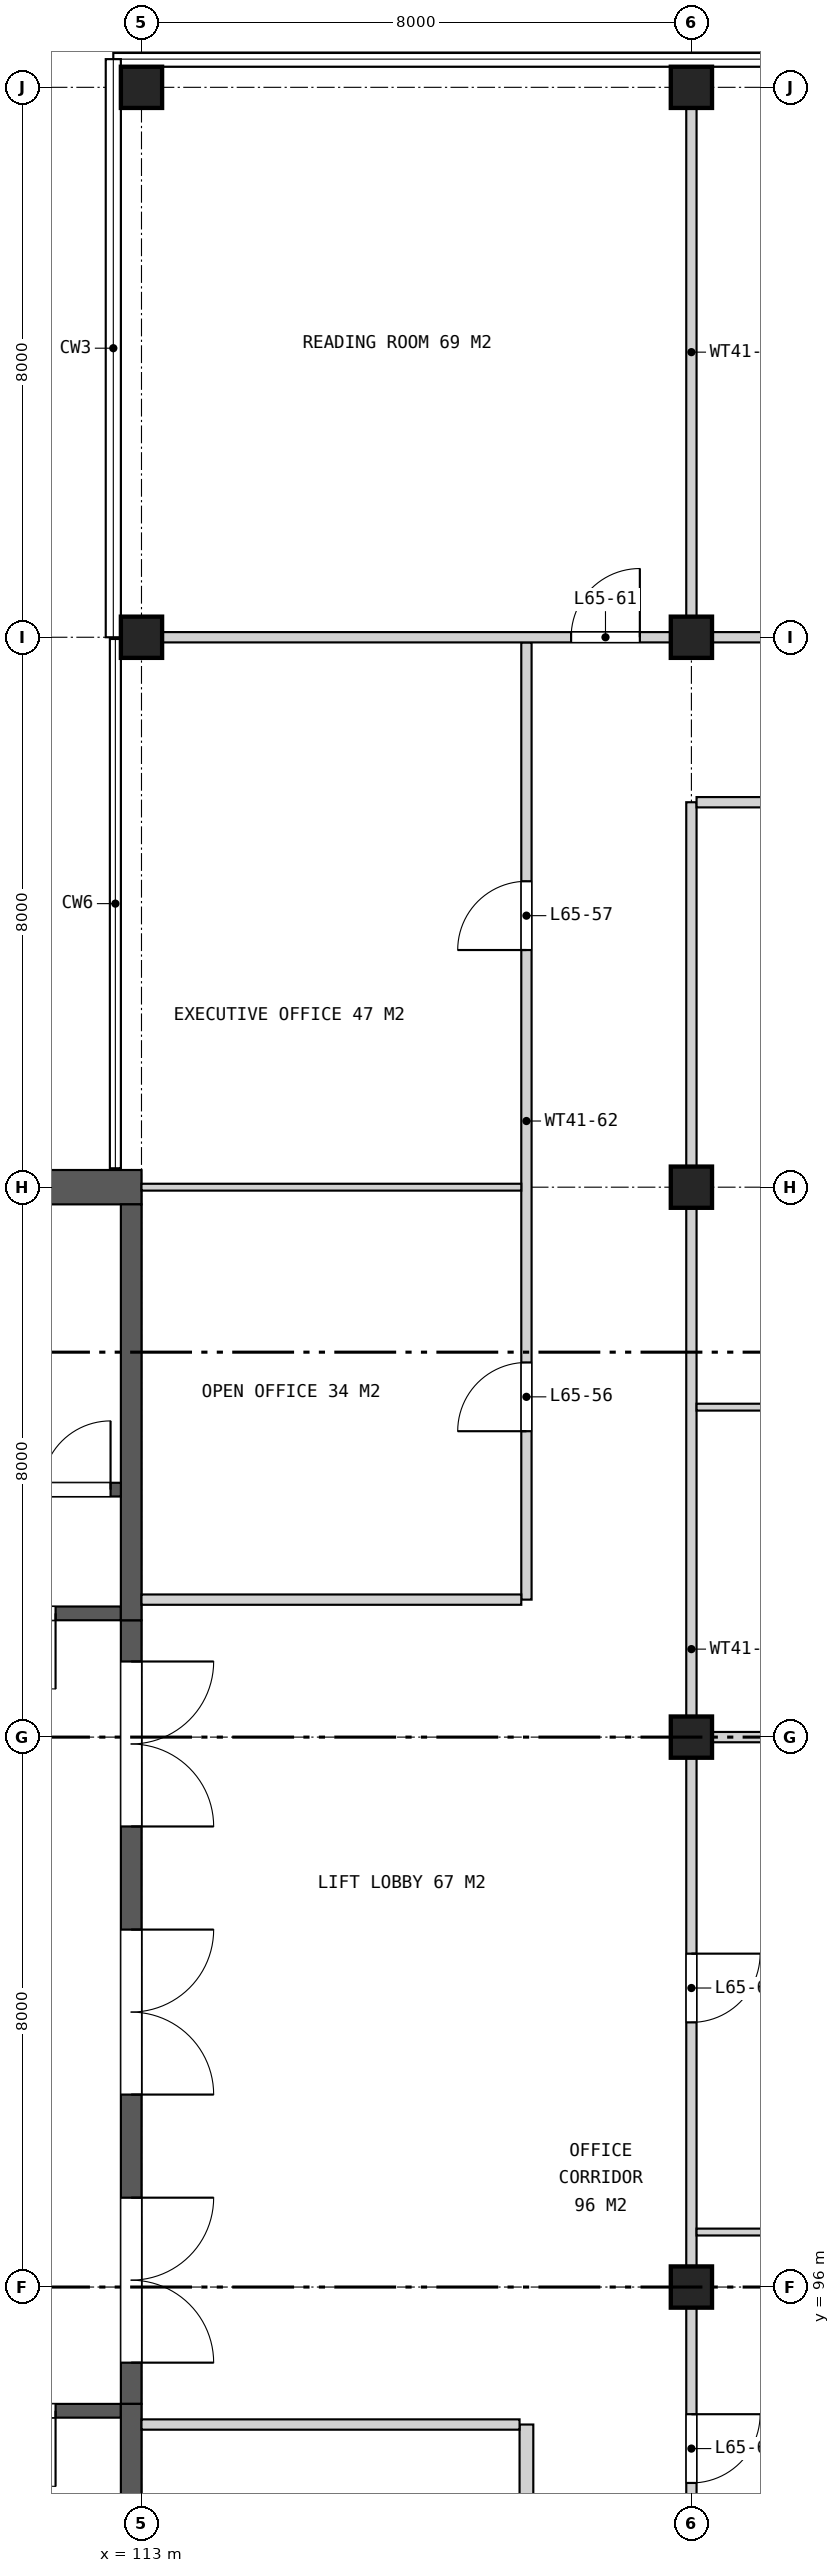
"""IFC4 building model, lengths in metres.
Left out: names, types, materials, properties, quantities, classifications, styles, units other than length and angle.
Written with IfcOpenShell. Run it as: python <this file> out.ifc"""

import sys

from ifc_helpers import new_model, si_unit, direction, frame, frame_2d, origin, origin_2d, place, context, subcontext, project, spatial, rectangle, extrude, element, fill, save


model = new_model("IFC4")
c1 = context("Model", 3, precision=1e-05, world=origin(), true_north=direction((0.0, 1.0)))
c2 = subcontext(c1, "Body", "Model", "MODEL_VIEW")
j1 = project(units=[si_unit("LENGTHUNIT", "METRE"), si_unit("PLANEANGLEUNIT", "RADIAN")], contexts=[c1])
p1 = place(None, origin())
s1 = spatial("IfcSite", under=j1, at=p1, CompositionType="ELEMENT")
p2 = place(p1, origin())
s2 = spatial("IfcBuilding", under=s1, at=p2, CompositionType="ELEMENT")
p3 = place(p2, frame((0.0, 0.0, 299.7)))
s3 = spatial("IfcBuildingStorey", under=s2, at=p3, CompositionType="ELEMENT", Elevation=299.7)
for number, where, z_axis, x_axis in (
    (1, (113.0, 120.0, 0.0), (0.0, 0.0, 1.0), (1.0, 0.0, 0.0)),
    (2, (113.0, 128.0, 0.0), (0.0, 0.0, 1.0), (1.0, 0.0, 0.0)),
    (3, (121.0, 96.0, 0.0), (0.0, 0.0, 1.0), (1.0, 0.0, 0.0)),
    (4, (121.0, 104.0, 0.0), (0.0, 0.0, 1.0), (1.0, 0.0, 0.0)),
    (5, (121.0, 112.0, 0.0), (0.0, 0.0, 1.0), (1.0, 0.0, 0.0)),
    (6, (121.0, 120.0, 0.0), (0.0, 0.0, 1.0), (1.0, 0.0, 0.0)),
    (7, (121.0, 128.0, 0.0), (0.0, 0.0, 1.0), (1.0, 0.0, 0.0)),
):
    element("IfcColumn", number, at=place(p3, frame(where, z_axis=z_axis, x_axis=x_axis)), inside=s3, PredefinedType="COLUMN", context=c2, shape_type="SweptSolid", body=[
        extrude(rectangle(XDim=0.6, YDim=0.6, at=origin_2d()), origin(), (0.0, 0.0, 1.0), 4.2),
    ])
p4 = place(p3, frame((113.0, 112.0, 0.0), z_axis=(0.0, 0.0, 1.0), x_axis=(-1.0, 0.0, 0.0)))
e8 = element("IfcWall", 8, at=p4, inside=s3, PredefinedType="SHEAR", context=c2, shape_type="SweptSolid", body=[
    extrude(rectangle(XDim=7.1, YDim=0.5, at=frame_2d((3.55, 0.0))), origin(), (0.0, 0.0, 1.0), 4.2),
])
p5 = place(p3, frame((112.85, 105.7, 0.0), z_axis=(0.0, 0.0, 1.0), x_axis=(0.0, -1.0, 0.0)))
e9 = element("IfcWall", 9, at=p5, inside=s3, PredefinedType="SHEAR", context=c2, shape_type="SweptSolid", body=[
    extrude(rectangle(XDim=11.4, YDim=0.3, at=frame_2d((5.7, 0.0))), origin(), (0.0, 0.0, 1.0), 4.2),
])
p6 = place(p5, frame((0.6, 0.0, 0.0)))
e10 = element("IfcOpeningElement", 10, at=p6, cuts=e9, PredefinedType="OPENING", context=c2, shape_type="SweptSolid", body=[
    extrude(rectangle(XDim=2.4, YDim=2.4, at=frame_2d((1.2, 1.2))), frame((0.0, 0.16, 0.0), z_axis=(0.0, -1.0, 0.0), x_axis=(1.0, 0.0, 0.0)), (0.0, 0.0, 1.0), 0.32),
])
p7 = place(p5, frame((4.5, 0.0, 0.0)))
e11 = element("IfcOpeningElement", 11, at=p7, cuts=e9, PredefinedType="OPENING", context=c2, shape_type="SweptSolid", body=[
    extrude(rectangle(XDim=2.4, YDim=2.4, at=frame_2d((1.2, 1.2))), frame((0.0, 0.16, 0.0), z_axis=(0.0, -1.0, 0.0), x_axis=(1.0, 0.0, 0.0)), (0.0, 0.0, 1.0), 0.32),
])
p8 = place(p5, frame((8.4, 0.0, 0.0)))
e12 = element("IfcOpeningElement", 12, at=p8, cuts=e9, PredefinedType="OPENING", context=c2, shape_type="SweptSolid", body=[
    extrude(rectangle(XDim=2.4, YDim=2.4, at=frame_2d((1.2, 1.2))), frame((0.0, 0.16, 0.0), z_axis=(0.0, -1.0, 0.0), x_axis=(1.0, 0.0, 0.0)), (0.0, 0.0, 1.0), 0.32),
])
p9 = place(p3, frame((112.7, 94.2, 0.0), z_axis=(0.0, 0.0, 1.0), x_axis=(-1.0, 0.0, 0.0)))
e13 = element("IfcWall", 13, at=p9, inside=s3, PredefinedType="SHEAR", context=c2, shape_type="SweptSolid", body=[
    extrude(rectangle(XDim=15.45, YDim=0.2, at=frame_2d((7.725, 0.0))), origin(), (0.0, 0.0, 1.0), 4.2),
])
p10 = place(p9, frame((0.95, 0.0, 0.0)))
e14 = element("IfcOpeningElement", 14, at=p10, cuts=e13, PredefinedType="OPENING", context=c2, shape_type="SweptSolid", body=[
    extrude(rectangle(XDim=1.1, YDim=2.1, at=frame_2d((0.55, 1.05))), frame((0.0, 0.11, 0.0), z_axis=(0.0, -1.0, 0.0), x_axis=(1.0, 0.0, 0.0)), (0.0, 0.0, 1.0), 0.22),
])
p11 = place(p3, frame((112.85, 94.3, 0.0), z_axis=(0.0, 0.0, 1.0), x_axis=(0.0, -1.0, 0.0)))
e15 = element("IfcWall", 15, at=p11, inside=s3, PredefinedType="SHEAR", context=c2, shape_type="SweptSolid", body=[
    extrude(rectangle(XDim=6.05, YDim=0.3, at=frame_2d((3.025, 0.0))), origin(), (0.0, 0.0, 1.0), 4.2),
])
p12 = place(p3, frame((112.7, 105.8, 0.0), z_axis=(0.0, 0.0, 1.0), x_axis=(-1.0, 0.0, 0.0)))
e16 = element("IfcWall", 16, at=p12, inside=s3, PredefinedType="SHEAR", context=c2, shape_type="SweptSolid", body=[
    extrude(rectangle(XDim=15.45, YDim=0.2, at=frame_2d((7.725, 0.0))), origin(), (0.0, 0.0, 1.0), 4.2),
])
p13 = place(p12, frame((0.95, 0.0, 0.0)))
e17 = element("IfcOpeningElement", 17, at=p13, cuts=e16, PredefinedType="OPENING", context=c2, shape_type="SweptSolid", body=[
    extrude(rectangle(XDim=1.1, YDim=2.1, at=frame_2d((0.55, 1.05))), frame((0.0, 0.11, 0.0), z_axis=(0.0, -1.0, 0.0), x_axis=(1.0, 0.0, 0.0)), (0.0, 0.0, 1.0), 0.22),
])
p14 = place(p3, frame((112.85, 111.75, 0.0), z_axis=(0.0, 0.0, 1.0), x_axis=(0.0, -1.0, 0.0)))
e18 = element("IfcWall", 18, at=p14, inside=s3, PredefinedType="SHEAR", context=c2, shape_type="SweptSolid", body=[
    extrude(rectangle(XDim=6.05, YDim=0.3, at=frame_2d((3.025, 0.0))), origin(), (0.0, 0.0, 1.0), 4.2),
])
p15 = place(p3, frame((112.7, 107.6, 0.0), z_axis=(0.0, 0.0, 1.0), x_axis=(-1.0, 0.0, 0.0)))
e19 = element("IfcWall", 19, at=p15, inside=s3, PredefinedType="SHEAR", context=c2, shape_type="SweptSolid", body=[
    extrude(rectangle(XDim=6.8, YDim=0.2, at=frame_2d((3.4, 0.0))), origin(), (0.0, 0.0, 1.0), 4.2),
])
p16 = place(p15, frame((0.15, 0.0, 0.0)))
e20 = element("IfcOpeningElement", 20, at=p16, cuts=e19, PredefinedType="OPENING", context=c2, shape_type="SweptSolid", body=[
    extrude(rectangle(XDim=1.0, YDim=2.1, at=frame_2d((0.5, 1.05))), frame((0.0, 0.11, 0.0), z_axis=(0.0, -1.0, 0.0), x_axis=(1.0, 0.0, 0.0)), (0.0, 0.0, 1.0), 0.22),
])
p17 = place(p3, frame((118.6, 80.0, 0.0), z_axis=(0.0, 0.0, 1.0), x_axis=(0.0, 1.0, 0.0)))
e21 = element("IfcWall", 21, at=p17, inside=s3, PredefinedType="SOLIDWALL", context=c2, shape_type="SweptSolid", body=[
    extrude(rectangle(XDim=14.0, YDim=0.2, at=frame_2d((7.0, 0.0))), origin(), (0.0, 0.0, 1.0), 3.255),
])
p18 = place(p17, frame((11.75, 0.0, 0.0)))
e22 = element("IfcOpeningElement", 22, at=p18, cuts=e21, PredefinedType="OPENING", context=c2, shape_type="SweptSolid", body=[
    extrude(rectangle(XDim=1.0, YDim=2.1, at=frame_2d((0.5, 1.05))), frame((0.0, 0.11, 0.0), z_axis=(0.0, -1.0, 0.0), x_axis=(1.0, 0.0, 0.0)), (0.0, 0.0, 1.0), 0.22),
])
p19 = place(p17, frame((8.75, 0.0, 0.0)))
e23 = element("IfcOpeningElement", 23, at=p19, cuts=e21, PredefinedType="OPENING", context=c2, shape_type="SweptSolid", body=[
    extrude(rectangle(XDim=1.0, YDim=2.1, at=frame_2d((0.5, 1.05))), frame((0.0, 0.11, 0.0), z_axis=(0.0, -1.0, 0.0), x_axis=(1.0, 0.0, 0.0)), (0.0, 0.0, 1.0), 0.22),
])
p20 = place(p17, frame((3.45, 0.0, 0.0)))
e24 = element("IfcOpeningElement", 24, at=p20, cuts=e21, PredefinedType="OPENING", context=c2, shape_type="SweptSolid", body=[
    extrude(rectangle(XDim=1.0, YDim=2.1, at=frame_2d((0.5, 1.05))), frame((0.0, 0.11, 0.0), z_axis=(0.0, -1.0, 0.0), x_axis=(1.0, 0.0, 0.0)), (0.0, 0.0, 1.0), 0.22),
])
p21 = place(p3, frame((118.6, 106.0, 0.0), z_axis=(0.0, 0.0, 1.0), x_axis=(0.0, 1.0, 0.0)))
e25 = element("IfcWall", 25, at=p21, inside=s3, PredefinedType="PARTITIONING", context=c2, shape_type="SweptSolid", body=[
    extrude(rectangle(XDim=13.925, YDim=0.15, at=frame_2d((6.962, 0.0))), origin(), (0.0, 0.0, 1.0), 3.255),
])
p22 = place(p21, frame((2.45, 0.0, 0.0)))
e26 = element("IfcOpeningElement", 26, at=p22, cuts=e25, PredefinedType="OPENING", context=c2, shape_type="SweptSolid", body=[
    extrude(rectangle(XDim=1.0, YDim=2.1, at=frame_2d((0.5, 1.05))), frame((0.0, 0.085, 0.0), z_axis=(0.0, -1.0, 0.0), x_axis=(1.0, 0.0, 0.0)), (0.0, 0.0, 1.0), 0.17),
])
p23 = place(p21, frame((9.45, 0.0, 0.0)))
e27 = element("IfcOpeningElement", 27, at=p23, cuts=e25, PredefinedType="OPENING", context=c2, shape_type="SweptSolid", body=[
    extrude(rectangle(XDim=1.0, YDim=2.1, at=frame_2d((0.5, 1.05))), frame((0.0, 0.085, 0.0), z_axis=(0.0, -1.0, 0.0), x_axis=(1.0, 0.0, 0.0)), (0.0, 0.0, 1.0), 0.17),
])
p24 = place(p3, frame((121.0, 82.4, 0.0), z_axis=(0.0, 0.0, 1.0), x_axis=(0.0, 1.0, 0.0)))
e28 = element("IfcWall", 28, at=p24, inside=s3, PredefinedType="PARTITIONING", context=c2, shape_type="SweptSolid", body=[
    extrude(rectangle(XDim=35.2, YDim=0.15, at=frame_2d((17.6, 0.0))), origin(), (0.0, 0.0, 1.0), 3.255),
])
p25 = place(p24, frame((6.15, 0.0, 0.0)))
e29 = element("IfcOpeningElement", 29, at=p25, cuts=e28, PredefinedType="OPENING", context=c2, shape_type="SweptSolid", body=[
    extrude(rectangle(XDim=1.0, YDim=2.1, at=frame_2d((0.5, 1.05))), frame((0.0, 0.085, 0.0), z_axis=(0.0, -1.0, 0.0), x_axis=(1.0, 0.0, 0.0)), (0.0, 0.0, 1.0), 0.17),
])
p26 = place(p24, frame((10.75, 0.0, 0.0)))
e30 = element("IfcOpeningElement", 30, at=p26, cuts=e28, PredefinedType="OPENING", context=c2, shape_type="SweptSolid", body=[
    extrude(rectangle(XDim=1.0, YDim=2.1, at=frame_2d((0.5, 1.05))), frame((0.0, 0.085, 0.0), z_axis=(0.0, -1.0, 0.0), x_axis=(1.0, 0.0, 0.0)), (0.0, 0.0, 1.0), 0.17),
])
p27 = place(p24, frame((17.45, 0.0, 0.0)))
e31 = element("IfcOpeningElement", 31, at=p27, cuts=e28, PredefinedType="OPENING", context=c2, shape_type="SweptSolid", body=[
    extrude(rectangle(XDim=1.0, YDim=2.1, at=frame_2d((0.5, 1.05))), frame((0.0, 0.085, 0.0), z_axis=(0.0, -1.0, 0.0), x_axis=(1.0, 0.0, 0.0)), (0.0, 0.0, 1.0), 0.17),
])
p28 = place(p3, frame((121.0, 120.075, 0.0), z_axis=(0.0, 0.0, 1.0), x_axis=(0.0, 1.0, 0.0)))
e32 = element("IfcWall", 32, at=p28, inside=s3, PredefinedType="PARTITIONING", context=c2, shape_type="SweptSolid", body=[
    extrude(rectangle(XDim=8.145, YDim=0.15, at=frame_2d((4.073, 0.0))), origin(), (0.0, 0.0, 1.0), 3.255),
])
p29 = place(p3, frame((113.0, 94.0, 0.0), z_axis=(0.0, 0.0, 1.0), x_axis=(1.0, 0.0, 0.0)))
e33 = element("IfcWall", 33, at=p29, inside=s3, PredefinedType="PARTITIONING", context=c2, shape_type="SweptSolid", body=[
    extrude(rectangle(XDim=5.5, YDim=0.15, at=frame_2d((2.75, 0.0))), origin(), (0.0, 0.0, 1.0), 3.255),
])
p30 = place(p3, frame((121.075, 104.0, 0.0), z_axis=(0.0, 0.0, 1.0), x_axis=(1.0, 0.0, 0.0)))
e34 = element("IfcWall", 34, at=p30, inside=s3, PredefinedType="PARTITIONING", context=c2, shape_type="SweptSolid", body=[
    extrude(rectangle(XDim=7.85, YDim=0.15, at=frame_2d((3.925, 0.0))), origin(), (0.0, 0.0, 1.0), 3.255),
])
p31 = place(p3, frame((113.0, 106.0, 0.0), z_axis=(0.0, 0.0, 1.0), x_axis=(1.0, 0.0, 0.0)))
e35 = element("IfcWall", 35, at=p31, inside=s3, PredefinedType="PARTITIONING", context=c2, shape_type="SweptSolid", body=[
    extrude(rectangle(XDim=5.525, YDim=0.15, at=frame_2d((2.762, 0.0))), origin(), (0.0, 0.0, 1.0), 3.255),
])
p32 = place(p3, frame((121.075, 108.8, 0.0), z_axis=(0.0, 0.0, 1.0), x_axis=(1.0, 0.0, 0.0)))
e36 = element("IfcWall", 36, at=p32, inside=s3, PredefinedType="PARTITIONING", context=c2, shape_type="SweptSolid", body=[
    extrude(rectangle(XDim=7.85, YDim=0.1, at=frame_2d((3.925, 0.0))), origin(), (0.0, 0.0, 1.0), 3.255),
])
p33 = place(p3, frame((113.0, 112.0, 0.0), z_axis=(0.0, 0.0, 1.0), x_axis=(1.0, 0.0, 0.0)))
e37 = element("IfcWall", 37, at=p33, inside=s3, PredefinedType="PARTITIONING", context=c2, shape_type="SweptSolid", body=[
    extrude(rectangle(XDim=5.525, YDim=0.1, at=frame_2d((2.762, 0.0))), origin(), (0.0, 0.0, 1.0), 3.255),
])
p34 = place(p3, frame((121.075, 117.6, 0.0), z_axis=(0.0, 0.0, 1.0), x_axis=(1.0, 0.0, 0.0)))
e38 = element("IfcWall", 38, at=p34, inside=s3, PredefinedType="PARTITIONING", context=c2, shape_type="SweptSolid", body=[
    extrude(rectangle(XDim=7.85, YDim=0.15, at=frame_2d((3.925, 0.0))), origin(), (0.0, 0.0, 1.0), 3.255),
])
p35 = place(p34, frame((3.45, 0.0, 0.0)))
e39 = element("IfcOpeningElement", 39, at=p35, cuts=e38, PredefinedType="OPENING", context=c2, shape_type="SweptSolid", body=[
    extrude(rectangle(XDim=1.0, YDim=2.1, at=frame_2d((0.5, 1.05))), frame((0.0, 0.085, 0.0), z_axis=(0.0, -1.0, 0.0), x_axis=(1.0, 0.0, 0.0)), (0.0, 0.0, 1.0), 0.17),
])
p36 = place(p3, frame((112.78, 120.0, 0.0), z_axis=(0.0, 0.0, 1.0), x_axis=(1.0, 0.0, 0.0)))
e40 = element("IfcWall", 40, at=p36, inside=s3, PredefinedType="PARTITIONING", context=c2, shape_type="SweptSolid", body=[
    extrude(rectangle(XDim=24.44, YDim=0.15, at=frame_2d((12.22, 0.0))), origin(), (0.0, 0.0, 1.0), 3.255),
])
p37 = place(p36, frame((6.47, 0.0, 0.0)))
e41 = element("IfcOpeningElement", 41, at=p37, cuts=e40, PredefinedType="OPENING", context=c2, shape_type="SweptSolid", body=[
    extrude(rectangle(XDim=1.0, YDim=2.1, at=frame_2d((0.5, 1.05))), frame((0.0, 0.085, 0.0), z_axis=(0.0, -1.0, 0.0), x_axis=(1.0, 0.0, 0.0)), (0.0, 0.0, 1.0), 0.17),
])
p38 = place(p36, frame((11.27, 0.0, 0.0)))
e42 = element("IfcOpeningElement", 42, at=p38, cuts=e40, PredefinedType="OPENING", context=c2, shape_type="SweptSolid", body=[
    extrude(rectangle(XDim=1.8, YDim=2.1, at=frame_2d((0.9, 1.05))), frame((0.0, 0.085, 0.0), z_axis=(0.0, -1.0, 0.0), x_axis=(1.0, 0.0, 0.0)), (0.0, 0.0, 1.0), 0.17),
])
p39 = place(p3, frame((121.075, 96.8, 0.0), z_axis=(0.0, 0.0, 1.0), x_axis=(1.0, 0.0, 0.0)))
e43 = element("IfcWall", 43, at=p39, inside=s3, PredefinedType="PARTITIONING", context=c2, shape_type="SweptSolid", body=[
    extrude(rectangle(XDim=3.85, YDim=0.1, at=frame_2d((1.925, 0.0))), origin(), (0.0, 0.0, 1.0), 3.255),
])
p40 = place(p6, origin())
e44 = element("IfcDoor", 44, at=p40, inside=s3, OperationType="DOUBLE_DOOR_SINGLE_SWING", PredefinedType="DOOR", context=c2, shape_type="SweptSolid", body=[
    extrude(rectangle(XDim=2.4, YDim=2.4, at=frame_2d((1.2, 1.2))), frame((0.0, 0.025, 0.0), z_axis=(0.0, -1.0, 0.0), x_axis=(1.0, 0.0, 0.0)), (0.0, 0.0, 1.0), 0.05),
])
fill(e10, e44)
p41 = place(p7, origin())
e45 = element("IfcDoor", 45, at=p41, inside=s3, OperationType="DOUBLE_DOOR_SINGLE_SWING", PredefinedType="DOOR", context=c2, shape_type="SweptSolid", body=[
    extrude(rectangle(XDim=2.4, YDim=2.4, at=frame_2d((1.2, 1.2))), frame((0.0, 0.025, 0.0), z_axis=(0.0, -1.0, 0.0), x_axis=(1.0, 0.0, 0.0)), (0.0, 0.0, 1.0), 0.05),
])
fill(e11, e45)
p42 = place(p8, origin())
e46 = element("IfcDoor", 46, at=p42, inside=s3, OperationType="DOUBLE_DOOR_SINGLE_SWING", PredefinedType="DOOR", context=c2, shape_type="SweptSolid", body=[
    extrude(rectangle(XDim=2.4, YDim=2.4, at=frame_2d((1.2, 1.2))), frame((0.0, 0.025, 0.0), z_axis=(0.0, -1.0, 0.0), x_axis=(1.0, 0.0, 0.0)), (0.0, 0.0, 1.0), 0.05),
])
fill(e12, e46)
p43 = place(p10, origin())
e47 = element("IfcDoor", 47, at=p43, inside=s3, OperationType="SINGLE_SWING_LEFT", PredefinedType="DOOR", context=c2, shape_type="SweptSolid", body=[
    extrude(rectangle(XDim=1.1, YDim=2.1, at=frame_2d((0.55, 1.05))), frame((0.0, 0.025, 0.0), z_axis=(0.0, -1.0, 0.0), x_axis=(1.0, 0.0, 0.0)), (0.0, 0.0, 1.0), 0.05),
])
fill(e14, e47)
p44 = place(p13, origin())
e48 = element("IfcDoor", 48, at=p44, inside=s3, OperationType="SINGLE_SWING_LEFT", PredefinedType="DOOR", context=c2, shape_type="SweptSolid", body=[
    extrude(rectangle(XDim=1.1, YDim=2.1, at=frame_2d((0.55, 1.05))), frame((0.0, 0.025, 0.0), z_axis=(0.0, -1.0, 0.0), x_axis=(1.0, 0.0, 0.0)), (0.0, 0.0, 1.0), 0.05),
])
fill(e17, e48)
p45 = place(p16, frame((1.0, 0.0, 0.0), z_axis=(0.0, 0.0, 1.0), x_axis=(-1.0, 0.0, 0.0)))
e49 = element("IfcDoor", 49, at=p45, inside=s3, OperationType="SINGLE_SWING_RIGHT", PredefinedType="DOOR", context=c2, shape_type="SweptSolid", body=[
    extrude(rectangle(XDim=1.0, YDim=2.1, at=frame_2d((0.5, 1.05))), frame((0.0, 0.025, 0.0), z_axis=(0.0, -1.0, 0.0), x_axis=(1.0, 0.0, 0.0)), (0.0, 0.0, 1.0), 0.05),
])
fill(e20, e49)
p46 = place(p22, origin())
e50 = element("IfcDoor", 50, at=p46, inside=s3, OperationType="SINGLE_SWING_LEFT", PredefinedType="DOOR", context=c2, shape_type="SweptSolid", body=[
    extrude(rectangle(XDim=1.0, YDim=2.1, at=frame_2d((0.5, 1.05))), frame((0.0, 0.025, 0.0), z_axis=(0.0, -1.0, 0.0), x_axis=(1.0, 0.0, 0.0)), (0.0, 0.0, 1.0), 0.05),
])
fill(e26, e50)
p47 = place(p23, origin())
e51 = element("IfcDoor", 51, at=p47, inside=s3, OperationType="SINGLE_SWING_LEFT", PredefinedType="DOOR", context=c2, shape_type="SweptSolid", body=[
    extrude(rectangle(XDim=1.0, YDim=2.1, at=frame_2d((0.5, 1.05))), frame((0.0, 0.025, 0.0), z_axis=(0.0, -1.0, 0.0), x_axis=(1.0, 0.0, 0.0)), (0.0, 0.0, 1.0), 0.05),
])
fill(e27, e51)
p48 = place(p37, origin())
e52 = element("IfcDoor", 52, at=p48, inside=s3, OperationType="SINGLE_SWING_RIGHT", PredefinedType="DOOR", context=c2, shape_type="SweptSolid", body=[
    extrude(rectangle(XDim=1.0, YDim=2.1, at=frame_2d((0.5, 1.05))), frame((0.0, 0.025, 0.0), z_axis=(0.0, -1.0, 0.0), x_axis=(1.0, 0.0, 0.0)), (0.0, 0.0, 1.0), 0.05),
])
fill(e41, e52)
p49 = place(p26, frame((1.0, 0.0, 0.0), z_axis=(0.0, 0.0, 1.0), x_axis=(-1.0, 0.0, 0.0)))
e53 = element("IfcDoor", 53, at=p49, inside=s3, OperationType="SINGLE_SWING_LEFT", PredefinedType="DOOR", context=c2, shape_type="SweptSolid", body=[
    extrude(rectangle(XDim=1.0, YDim=2.1, at=frame_2d((0.5, 1.05))), frame((0.0, 0.025, 0.0), z_axis=(0.0, -1.0, 0.0), x_axis=(1.0, 0.0, 0.0)), (0.0, 0.0, 1.0), 0.05),
])
fill(e30, e53)
p50 = place(p27, frame((1.0, 0.0, 0.0), z_axis=(0.0, 0.0, 1.0), x_axis=(-1.0, 0.0, 0.0)))
e54 = element("IfcDoor", 54, at=p50, inside=s3, OperationType="SINGLE_SWING_LEFT", PredefinedType="DOOR", context=c2, shape_type="SweptSolid", body=[
    extrude(rectangle(XDim=1.0, YDim=2.1, at=frame_2d((0.5, 1.05))), frame((0.0, 0.025, 0.0), z_axis=(0.0, -1.0, 0.0), x_axis=(1.0, 0.0, 0.0)), (0.0, 0.0, 1.0), 0.05),
])
fill(e31, e54)
save(model, sys.argv[1])
